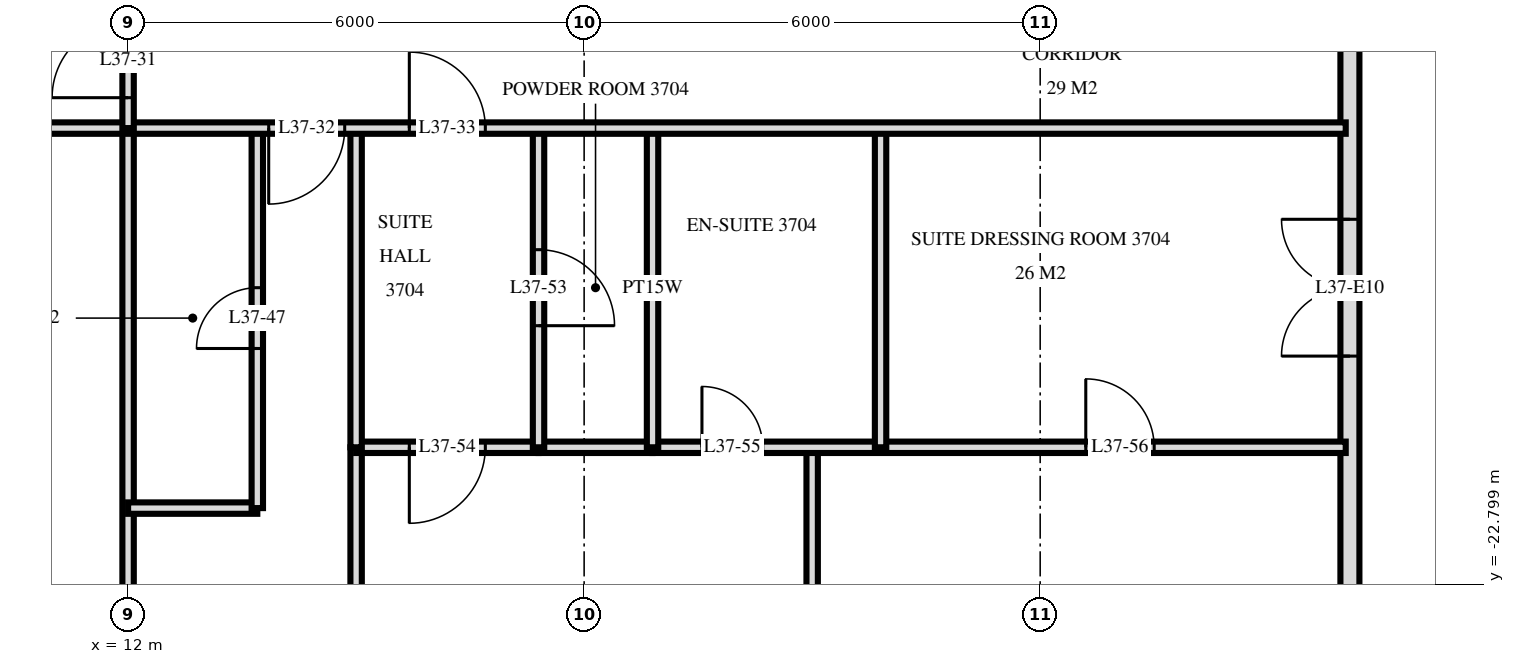
"""IFC4 building model, lengths in metres.
Left out: names, types, materials, properties, quantities, classifications, styles, units other than length and angle.
Written with IfcOpenShell. Run it as: python <this file> out.ifc"""

import sys

from ifc_helpers import new_model, si_unit, direction, frame, frame_2d, origin, place, context, subcontext, project, spatial, rectangle, extrude, element, fill, save


model = new_model("IFC4")
c1 = context("Model", 3, precision=1e-05, world=origin(), true_north=direction((0.0, 1.0)))
c2 = subcontext(c1, "Body", "Model", "MODEL_VIEW")
j1 = project(units=[si_unit("LENGTHUNIT", "METRE"), si_unit("PLANEANGLEUNIT", "RADIAN")], contexts=[c1])
p1 = place(None, origin())
s1 = spatial("IfcSite", under=j1, at=p1, CompositionType="ELEMENT")
p2 = place(p1, origin())
s2 = spatial("IfcBuilding", under=s1, at=p2, CompositionType="ELEMENT")
p3 = place(p2, frame((0.0, 0.0, 145.2)))
s3 = spatial("IfcBuildingStorey", under=s2, at=p3, CompositionType="ELEMENT", Elevation=145.2)
p4 = place(p3, frame((28.075, -29.275, 0.0), z_axis=(0.0, 0.0, 1.0), x_axis=(0.0, 1.0, 0.0)))
e1 = element("IfcWall", 1, at=p4, inside=s3, PredefinedType="SOLIDWALL", context=c2, shape_type="SweptSolid", body=[
    extrude(rectangle(XDim=25.951, YDim=0.25, at=frame_2d((12.975, 0.0))), origin(), (0.0, 0.0, 1.0), 3.32),
])
p5 = place(p4, frame((0.575, 0.0, 0.0)))
e2 = element("IfcOpeningElement", 2, at=p5, cuts=e1, PredefinedType="OPENING", context=c2, shape_type="SweptSolid", body=[
    extrude(rectangle(XDim=1.8, YDim=2.4, at=frame_2d((0.9, 1.2))), frame((0.0, 0.135, 0.0), z_axis=(0.0, -1.0, 0.0), x_axis=(1.0, 0.0, 0.0)), (0.0, 0.0, 1.0), 0.27),
])
p6 = place(p4, frame((3.325, 0.0, 0.3)))
e3 = element("IfcOpeningElement", 3, at=p6, cuts=e1, PredefinedType="OPENING", context=c2, shape_type="SweptSolid", body=[
    extrude(rectangle(XDim=1.8, YDim=2.1, at=frame_2d((0.9, 1.05))), frame((0.0, 0.135, 0.0), z_axis=(0.0, -1.0, 0.0), x_axis=(1.0, 0.0, 0.0)), (0.0, 0.0, 1.0), 0.27),
])
p7 = place(p4, frame((9.475, 0.0, 0.0)))
e4 = element("IfcOpeningElement", 4, at=p7, cuts=e1, PredefinedType="OPENING", context=c2, shape_type="SweptSolid", body=[
    extrude(rectangle(XDim=1.8, YDim=2.4, at=frame_2d((0.9, 1.2))), frame((0.0, 0.135, 0.0), z_axis=(0.0, -1.0, 0.0), x_axis=(1.0, 0.0, 0.0)), (0.0, 0.0, 1.0), 0.27),
])
p8 = place(p4, frame((14.575, 0.0, 0.3)))
e5 = element("IfcOpeningElement", 5, at=p8, cuts=e1, PredefinedType="OPENING", context=c2, shape_type="SweptSolid", body=[
    extrude(rectangle(XDim=2.4, YDim=2.1, at=frame_2d((1.2, 1.05))), frame((0.0, 0.135, 0.0), z_axis=(0.0, -1.0, 0.0), x_axis=(1.0, 0.0, 0.0)), (0.0, 0.0, 1.0), 0.27),
])
p9 = place(p4, frame((17.875, 0.0, 0.0)))
e6 = element("IfcOpeningElement", 6, at=p9, cuts=e1, PredefinedType="OPENING", context=c2, shape_type="SweptSolid", body=[
    extrude(rectangle(XDim=1.8, YDim=2.4, at=frame_2d((0.9, 1.2))), frame((0.0, 0.135, 0.0), z_axis=(0.0, -1.0, 0.0), x_axis=(1.0, 0.0, 0.0)), (0.0, 0.0, 1.0), 0.27),
])
p10 = place(p3, frame((21.9, -21.0, 0.0), z_axis=(0.0, 0.0, 1.0), x_axis=(0.0, 1.0, 0.0)))
e7 = element("IfcWall", 7, at=p10, inside=s3, PredefinedType="PARTITIONING", context=c2, shape_type="SweptSolid", body=[
    extrude(rectangle(XDim=4.2, YDim=0.15, at=frame_2d((2.1, 0.0))), origin(), (0.0, 0.0, 1.0), 3.32),
])
p11 = place(p3, frame((21.0, -33.62, 0.0), z_axis=(0.0, 0.0, 1.0), x_axis=(0.0, 1.0, 0.0)))
e8 = element("IfcWall", 8, at=p11, inside=s3, PredefinedType="PARTITIONING", context=c2, shape_type="SweptSolid", body=[
    extrude(rectangle(XDim=12.62, YDim=0.15, at=frame_2d((6.31, 0.0))), origin(), (0.0, 0.0, 1.0), 3.32),
])
p12 = place(p11, frame((5.77, 0.0, 0.0)))
e9 = element("IfcOpeningElement", 9, at=p12, cuts=e8, PredefinedType="OPENING", context=c2, shape_type="SweptSolid", body=[
    extrude(rectangle(XDim=0.9, YDim=2.1, at=frame_2d((0.45, 1.05))), frame((0.0, 0.085, 0.0), z_axis=(0.0, -1.0, 0.0), x_axis=(1.0, 0.0, 0.0)), (0.0, 0.0, 1.0), 0.17),
])
p13 = place(p3, frame((18.9, -21.0, 0.0), z_axis=(0.0, 0.0, 1.0), x_axis=(0.0, 1.0, 0.0)))
e10 = element("IfcWall", 10, at=p13, inside=s3, PredefinedType="PLUMBINGWALL", context=c2, shape_type="SweptSolid", body=[
    extrude(rectangle(XDim=4.2, YDim=0.15, at=frame_2d((2.1, 0.0))), origin(), (0.0, 0.0, 1.0), 3.32),
])
p14 = place(p3, frame((17.4, -21.0, 0.0), z_axis=(0.0, 0.0, 1.0), x_axis=(0.0, 1.0, 0.0)))
e11 = element("IfcWall", 11, at=p14, inside=s3, PredefinedType="PARTITIONING", context=c2, shape_type="SweptSolid", body=[
    extrude(rectangle(XDim=4.2, YDim=0.15, at=frame_2d((2.1, 0.0))), origin(), (0.0, 0.0, 1.0), 3.32),
])
p15 = place(p14, frame((1.6, 0.0, 0.0)))
e12 = element("IfcOpeningElement", 12, at=p15, cuts=e11, PredefinedType="OPENING", context=c2, shape_type="SweptSolid", body=[
    extrude(rectangle(XDim=1.0, YDim=2.1, at=frame_2d((0.5, 1.05))), frame((0.0, 0.085, 0.0), z_axis=(0.0, -1.0, 0.0), x_axis=(1.0, 0.0, 0.0)), (0.0, 0.0, 1.0), 0.17),
])
p16 = place(p3, frame((15.0, -21.0, 0.0), z_axis=(0.0, 0.0, 1.0), x_axis=(0.0, 1.0, 0.0)))
e13 = element("IfcWall", 13, at=p16, inside=s3, PredefinedType="PARTITIONING", context=c2, shape_type="SweptSolid", body=[
    extrude(rectangle(XDim=4.2, YDim=0.15, at=frame_2d((2.1, 0.0))), origin(), (0.0, 0.0, 1.0), 3.32),
])
p17 = place(p3, frame((15.0, -33.62, 0.0), z_axis=(0.0, 0.0, 1.0), x_axis=(0.0, 1.0, 0.0)))
e14 = element("IfcWall", 14, at=p17, inside=s3, PredefinedType="PARTITIONING", context=c2, shape_type="SweptSolid", body=[
    extrude(rectangle(XDim=12.62, YDim=0.15, at=frame_2d((6.31, 0.0))), origin(), (0.0, 0.0, 1.0), 3.32),
])
p18 = place(p3, frame((13.7, -21.8, 0.0), z_axis=(0.0, 0.0, 1.0), x_axis=(0.0, 1.0, 0.0)))
e15 = element("IfcWall", 15, at=p18, inside=s3, PredefinedType="PARTITIONING", context=c2, shape_type="SweptSolid", body=[
    extrude(rectangle(XDim=5.0, YDim=0.15, at=frame_2d((2.5, 0.0))), origin(), (0.0, 0.0, 1.0), 3.32),
])
p19 = place(p18, frame((2.1, 0.0, 0.0)))
e16 = element("IfcOpeningElement", 16, at=p19, cuts=e15, PredefinedType="OPENING", context=c2, shape_type="SweptSolid", body=[
    extrude(rectangle(XDim=0.8, YDim=2.1, at=frame_2d((0.4, 1.05))), frame((0.0, 0.085, 0.0), z_axis=(0.0, -1.0, 0.0), x_axis=(1.0, 0.0, 0.0)), (0.0, 0.0, 1.0), 0.17),
])
p20 = place(p3, frame((12.0, -16.8, 0.0), z_axis=(0.0, 0.0, 1.0), x_axis=(0.0, 1.0, 0.0)))
e17 = element("IfcWall", 17, at=p20, inside=s3, PredefinedType="PARTITIONING", context=c2, shape_type="SweptSolid", body=[
    extrude(rectangle(XDim=1.75, YDim=0.15, at=frame_2d((0.875, 0.0))), origin(), (0.0, 0.0, 1.0), 3.32),
])
p21 = place(p20, frame((0.4, 0.0, 0.0)))
e18 = element("IfcOpeningElement", 18, at=p21, cuts=e17, PredefinedType="OPENING", context=c2, shape_type="SweptSolid", body=[
    extrude(rectangle(XDim=1.0, YDim=2.1, at=frame_2d((0.5, 1.05))), frame((0.0, 0.085, 0.0), z_axis=(0.0, -1.0, 0.0), x_axis=(1.0, 0.0, 0.0)), (0.0, 0.0, 1.0), 0.17),
])
p22 = place(p3, frame((12.0, -33.62, 0.0), z_axis=(0.0, 0.0, 1.0), x_axis=(0.0, 1.0, 0.0)))
e19 = element("IfcWall", 19, at=p22, inside=s3, PredefinedType="PARTITIONING", context=c2, shape_type="SweptSolid", body=[
    extrude(rectangle(XDim=16.82, YDim=0.15, at=frame_2d((8.41, 0.0))), origin(), (0.0, 0.0, 1.0), 3.32),
])
p23 = place(p3, frame((12.0, -21.8, 0.0), z_axis=(0.0, 0.0, 1.0), x_axis=(1.0, 0.0, 0.0)))
e20 = element("IfcWall", 20, at=p23, inside=s3, PredefinedType="PARTITIONING", context=c2, shape_type="SweptSolid", body=[
    extrude(rectangle(XDim=1.7, YDim=0.15, at=frame_2d((0.85, 0.0))), origin(), (0.0, 0.0, 1.0), 3.32),
])
p24 = place(p3, frame((15.0, -21.0, 0.0), z_axis=(0.0, 0.0, 1.0), x_axis=(1.0, 0.0, 0.0)))
e21 = element("IfcWall", 21, at=p24, inside=s3, PredefinedType="PARTITIONING", context=c2, shape_type="SweptSolid", body=[
    extrude(rectangle(XDim=2.4, YDim=0.15, at=frame_2d((1.2, 0.0))), origin(), (0.0, 0.0, 1.0), 3.32),
])
p25 = place(p24, frame((0.7, 0.0, 0.0)))
e22 = element("IfcOpeningElement", 22, at=p25, cuts=e21, PredefinedType="OPENING", context=c2, shape_type="SweptSolid", body=[
    extrude(rectangle(XDim=1.0, YDim=2.1, at=frame_2d((0.5, 1.05))), frame((0.0, 0.085, 0.0), z_axis=(0.0, -1.0, 0.0), x_axis=(1.0, 0.0, 0.0)), (0.0, 0.0, 1.0), 0.17),
])
p26 = place(p3, frame((18.9, -21.0, 0.0), z_axis=(0.0, 0.0, 1.0), x_axis=(1.0, 0.0, 0.0)))
e23 = element("IfcWall", 23, at=p26, inside=s3, PredefinedType="PARTITIONING", context=c2, shape_type="SweptSolid", body=[
    extrude(rectangle(XDim=9.12, YDim=0.15, at=frame_2d((4.56, 0.0))), origin(), (0.0, 0.0, 1.0), 3.32),
])
p27 = place(p26, frame((0.65, 0.0, 0.0)))
e24 = element("IfcOpeningElement", 24, at=p27, cuts=e23, PredefinedType="OPENING", context=c2, shape_type="SweptSolid", body=[
    extrude(rectangle(XDim=0.8, YDim=2.1, at=frame_2d((0.4, 1.05))), frame((0.0, 0.085, 0.0), z_axis=(0.0, -1.0, 0.0), x_axis=(1.0, 0.0, 0.0)), (0.0, 0.0, 1.0), 0.17),
])
p28 = place(p26, frame((5.7, 0.0, 0.0)))
e25 = element("IfcOpeningElement", 25, at=p28, cuts=e23, PredefinedType="OPENING", context=c2, shape_type="SweptSolid", body=[
    extrude(rectangle(XDim=0.9, YDim=2.1, at=frame_2d((0.45, 1.05))), frame((0.0, 0.085, 0.0), z_axis=(0.0, -1.0, 0.0), x_axis=(1.0, 0.0, 0.0)), (0.0, 0.0, 1.0), 0.17),
])
p29 = place(p3, frame((17.4, -21.0, 0.0), z_axis=(0.0, 0.0, 1.0), x_axis=(1.0, 0.0, 0.0)))
e26 = element("IfcWall", 26, at=p29, inside=s3, PredefinedType="PLUMBINGWALL", context=c2, shape_type="SweptSolid", body=[
    extrude(rectangle(XDim=1.5, YDim=0.15, at=frame_2d((0.75, 0.0))), origin(), (0.0, 0.0, 1.0), 3.32),
])
p30 = place(p3, frame((-28.02, -16.8, 0.0), z_axis=(0.0, 0.0, 1.0), x_axis=(1.0, 0.0, 0.0)))
e27 = element("IfcWall", 27, at=p30, inside=s3, PredefinedType="PARTITIONING", context=c2, shape_type="SweptSolid", body=[
    extrude(rectangle(XDim=56.04, YDim=0.15, at=frame_2d((28.02, 0.0))), origin(), (0.0, 0.0, 1.0), 3.32),
])
p31 = place(p30, frame((13.17, 0.0, 0.0)))
e28 = element("IfcOpeningElement", 28, at=p31, cuts=e27, PredefinedType="OPENING", context=c2, shape_type="SweptSolid", body=[
    extrude(rectangle(XDim=1.0, YDim=2.1, at=frame_2d((0.5, 1.05))), frame((0.0, 0.085, 0.0), z_axis=(0.0, -1.0, 0.0), x_axis=(1.0, 0.0, 0.0)), (0.0, 0.0, 1.0), 0.17),
])
p32 = place(p30, frame((11.32, 0.0, 0.0)))
e29 = element("IfcOpeningElement", 29, at=p32, cuts=e27, PredefinedType="OPENING", context=c2, shape_type="SweptSolid", body=[
    extrude(rectangle(XDim=1.0, YDim=2.1, at=frame_2d((0.5, 1.05))), frame((0.0, 0.085, 0.0), z_axis=(0.0, -1.0, 0.0), x_axis=(1.0, 0.0, 0.0)), (0.0, 0.0, 1.0), 0.17),
])
p33 = place(p30, frame((41.87, 0.0, 0.0)))
e30 = element("IfcOpeningElement", 30, at=p33, cuts=e27, PredefinedType="OPENING", context=c2, shape_type="SweptSolid", body=[
    extrude(rectangle(XDim=1.0, YDim=2.1, at=frame_2d((0.5, 1.05))), frame((0.0, 0.085, 0.0), z_axis=(0.0, -1.0, 0.0), x_axis=(1.0, 0.0, 0.0)), (0.0, 0.0, 1.0), 0.17),
])
p34 = place(p30, frame((43.72, 0.0, 0.0)))
e31 = element("IfcOpeningElement", 31, at=p34, cuts=e27, PredefinedType="OPENING", context=c2, shape_type="SweptSolid", body=[
    extrude(rectangle(XDim=1.0, YDim=2.1, at=frame_2d((0.5, 1.05))), frame((0.0, 0.085, 0.0), z_axis=(0.0, -1.0, 0.0), x_axis=(1.0, 0.0, 0.0)), (0.0, 0.0, 1.0), 0.17),
])
p35 = place(p30, frame((19.52, 0.0, 0.0)))
e32 = element("IfcOpeningElement", 32, at=p35, cuts=e27, PredefinedType="OPENING", context=c2, shape_type="SweptSolid", body=[
    extrude(rectangle(XDim=1.0, YDim=2.1, at=frame_2d((0.5, 1.05))), frame((0.0, 0.085, 0.0), z_axis=(0.0, -1.0, 0.0), x_axis=(1.0, 0.0, 0.0)), (0.0, 0.0, 1.0), 0.17),
])
p36 = place(p30, frame((27.52, 0.0, 0.0)))
e33 = element("IfcOpeningElement", 33, at=p36, cuts=e27, PredefinedType="OPENING", context=c2, shape_type="SweptSolid", body=[
    extrude(rectangle(XDim=1.0, YDim=2.1, at=frame_2d((0.5, 1.05))), frame((0.0, 0.085, 0.0), z_axis=(0.0, -1.0, 0.0), x_axis=(1.0, 0.0, 0.0)), (0.0, 0.0, 1.0), 0.17),
])
p37 = place(p30, frame((35.52, 0.0, 0.0)))
e34 = element("IfcOpeningElement", 34, at=p37, cuts=e27, PredefinedType="OPENING", context=c2, shape_type="SweptSolid", body=[
    extrude(rectangle(XDim=1.0, YDim=2.1, at=frame_2d((0.5, 1.05))), frame((0.0, 0.085, 0.0), z_axis=(0.0, -1.0, 0.0), x_axis=(1.0, 0.0, 0.0)), (0.0, 0.0, 1.0), 0.17),
])
p38 = place(p7, origin())
e35 = element("IfcDoor", 35, at=p38, inside=s3, OperationType="DOUBLE_DOOR_SINGLE_SWING", PredefinedType="DOOR", context=c2, shape_type="SweptSolid", body=[
    extrude(rectangle(XDim=1.8, YDim=2.4, at=frame_2d((0.9, 1.2))), frame((0.0, 0.025, 0.0), z_axis=(0.0, -1.0, 0.0), x_axis=(1.0, 0.0, 0.0)), (0.0, 0.0, 1.0), 0.05),
])
fill(e4, e35)
p39 = place(p21, origin())
e36 = element("IfcDoor", 36, at=p39, inside=s3, OperationType="SINGLE_SWING_RIGHT", PredefinedType="DOOR", context=c2, shape_type="SweptSolid", body=[
    extrude(rectangle(XDim=1.0, YDim=2.1, at=frame_2d((0.5, 1.05))), frame((0.0, 0.025, 0.0), z_axis=(0.0, -1.0, 0.0), x_axis=(1.0, 0.0, 0.0)), (0.0, 0.0, 1.0), 0.05),
])
fill(e18, e36)
p40 = place(p33, frame((0.5, 0.0, 0.0), z_axis=(0.0, 0.0, 1.0), x_axis=(-1.0, 0.0, 0.0)))
e37 = element("IfcDoor", 37, at=p40, inside=s3, OperationType="SINGLE_SWING_LEFT", PredefinedType="DOOR", context=c2, shape_type="SweptSolid", body=[
    extrude(rectangle(XDim=1.0, YDim=2.1, at=frame_2d((0.0, 1.05))), frame((0.0, -0.025, 0.0), z_axis=(0.0, 1.0, 0.0), x_axis=(-1.0, 0.0, 0.0)), (0.0, 0.0, 1.0), 0.05),
])
fill(e30, e37)
p41 = place(p34, origin())
e38 = element("IfcDoor", 38, at=p41, inside=s3, OperationType="SINGLE_SWING_RIGHT", PredefinedType="DOOR", context=c2, shape_type="SweptSolid", body=[
    extrude(rectangle(XDim=1.0, YDim=2.1, at=frame_2d((0.5, 1.05))), frame((0.0, 0.025, 0.0), z_axis=(0.0, -1.0, 0.0), x_axis=(1.0, 0.0, 0.0)), (0.0, 0.0, 1.0), 0.05),
])
fill(e31, e38)
p42 = place(p19, origin())
e39 = element("IfcDoor", 39, at=p42, inside=s3, OperationType="SINGLE_SWING_RIGHT", PredefinedType="DOOR", context=c2, shape_type="SweptSolid", body=[
    extrude(rectangle(XDim=0.8, YDim=2.1, at=frame_2d((0.4, 1.05))), frame((0.0, 0.025, 0.0), z_axis=(0.0, -1.0, 0.0), x_axis=(1.0, 0.0, 0.0)), (0.0, 0.0, 1.0), 0.05),
])
fill(e16, e39)
p43 = place(p15, frame((0.5, 0.0, 0.0), z_axis=(0.0, 0.0, 1.0), x_axis=(-1.0, 0.0, 0.0)))
e40 = element("IfcDoor", 40, at=p43, inside=s3, OperationType="SINGLE_SWING_LEFT", PredefinedType="DOOR", context=c2, shape_type="SweptSolid", body=[
    extrude(rectangle(XDim=1.0, YDim=2.1, at=frame_2d((0.0, 1.05))), frame((0.0, -0.025, 0.0), z_axis=(0.0, 1.0, 0.0), x_axis=(-1.0, 0.0, 0.0)), (0.0, 0.0, 1.0), 0.05),
])
fill(e12, e40)
p44 = place(p25, frame((0.5, 0.0, 0.0), z_axis=(0.0, 0.0, 1.0), x_axis=(-1.0, 0.0, 0.0)))
e41 = element("IfcDoor", 41, at=p44, inside=s3, OperationType="SINGLE_SWING_LEFT", PredefinedType="DOOR", context=c2, shape_type="SweptSolid", body=[
    extrude(rectangle(XDim=1.0, YDim=2.1, at=frame_2d((0.0, 1.05))), frame((0.0, -0.025, 0.0), z_axis=(0.0, 1.0, 0.0), x_axis=(-1.0, 0.0, 0.0)), (0.0, 0.0, 1.0), 0.05),
])
fill(e22, e41)
p45 = place(p27, origin())
e42 = element("IfcDoor", 42, at=p45, inside=s3, OperationType="SINGLE_SWING_RIGHT", PredefinedType="DOOR", context=c2, shape_type="SweptSolid", body=[
    extrude(rectangle(XDim=0.8, YDim=2.1, at=frame_2d((0.4, 1.05))), frame((0.0, 0.025, 0.0), z_axis=(0.0, -1.0, 0.0), x_axis=(1.0, 0.0, 0.0)), (0.0, 0.0, 1.0), 0.05),
])
fill(e24, e42)
p46 = place(p28, origin())
e43 = element("IfcDoor", 43, at=p46, inside=s3, OperationType="SINGLE_SWING_RIGHT", PredefinedType="DOOR", context=c2, shape_type="SweptSolid", body=[
    extrude(rectangle(XDim=0.9, YDim=2.1, at=frame_2d((0.45, 1.05))), frame((0.0, 0.025, 0.0), z_axis=(0.0, -1.0, 0.0), x_axis=(1.0, 0.0, 0.0)), (0.0, 0.0, 1.0), 0.05),
])
fill(e25, e43)
save(model, sys.argv[1])
